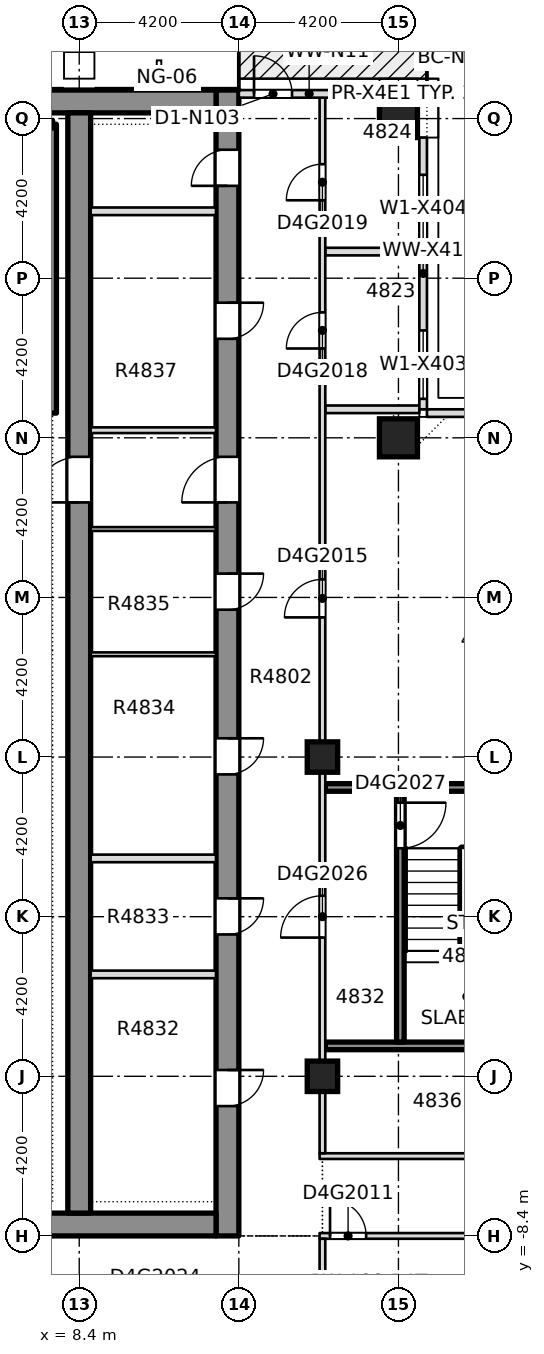
"""IFC4 building model, lengths in metres.
Left out: names, types, materials, properties, quantities, classifications, styles, units other than length and angle.
Written with IfcOpenShell. Run it as: python <this file> out.ifc"""

import sys

from ifc_helpers import new_model, si_unit, direction, frame, frame_2d, origin, origin_2d, place, context, subcontext, project, spatial, rectangle, extrude, element, fill, save


model = new_model("IFC4")
c1 = context("Model", 3, precision=1e-05, world=origin(), true_north=direction((0.0, 1.0)))
c2 = subcontext(c1, "Body", "Model", "MODEL_VIEW")
j1 = project(units=[si_unit("LENGTHUNIT", "METRE"), si_unit("PLANEANGLEUNIT", "RADIAN")], contexts=[c1])
p1 = place(None, origin())
s1 = spatial("IfcSite", under=j1, at=p1, CompositionType="ELEMENT")
p2 = place(p1, origin())
s2 = spatial("IfcBuilding", under=s1, at=p2, CompositionType="ELEMENT")
p3 = place(p2, frame((0.0, 0.0, 185.9)))
s3 = spatial("IfcBuildingStorey", under=s2, at=p3, CompositionType="ELEMENT", Elevation=185.9)
p4 = place(p3, frame((12.3, -8.4, -0.4), z_axis=(0.0, 0.0, 1.0), x_axis=(0.0, 1.0, 0.0)))
e1 = element("IfcWall", 1, at=p4, inside=s3, PredefinedType="SHEAR", context=c2, shape_type="SweptSolid", body=[
    extrude(rectangle(XDim=30.15, YDim=0.6, at=frame_2d((15.075, 0.0))), origin(), (0.0, 0.0, 1.0), 3.45),
])
p5 = place(p4, frame((3.416, 0.0, 0.4)))
e2 = element("IfcOpeningElement", 2, at=p5, cuts=e1, PredefinedType="OPENING", context=c2, shape_type="SweptSolid", body=[
    extrude(rectangle(XDim=0.95, YDim=2.1, at=frame_2d((0.475, 1.05))), frame((0.0, 0.31, 0.0), z_axis=(0.0, -1.0, 0.0), x_axis=(1.0, 0.0, 0.0)), (0.0, 0.0, 1.0), 0.62),
])
p6 = place(p4, frame((7.932, 0.0, 0.4)))
e3 = element("IfcOpeningElement", 3, at=p6, cuts=e1, PredefinedType="OPENING", context=c2, shape_type="SweptSolid", body=[
    extrude(rectangle(XDim=0.95, YDim=2.1, at=frame_2d((0.475, 1.05))), frame((0.0, 0.31, 0.0), z_axis=(0.0, -1.0, 0.0), x_axis=(1.0, 0.0, 0.0)), (0.0, 0.0, 1.0), 0.62),
])
p7 = place(p4, frame((12.144, 0.0, 0.4)))
e4 = element("IfcOpeningElement", 4, at=p7, cuts=e1, PredefinedType="OPENING", context=c2, shape_type="SweptSolid", body=[
    extrude(rectangle(XDim=0.95, YDim=2.1, at=frame_2d((0.475, 1.05))), frame((0.0, 0.31, 0.0), z_axis=(0.0, -1.0, 0.0), x_axis=(1.0, 0.0, 0.0)), (0.0, 0.0, 1.0), 0.62),
])
p8 = place(p4, frame((16.477, 0.0, 0.4)))
e5 = element("IfcOpeningElement", 5, at=p8, cuts=e1, PredefinedType="OPENING", context=c2, shape_type="SweptSolid", body=[
    extrude(rectangle(XDim=0.95, YDim=2.1, at=frame_2d((0.475, 1.05))), frame((0.0, 0.31, 0.0), z_axis=(0.0, -1.0, 0.0), x_axis=(1.0, 0.0, 0.0)), (0.0, 0.0, 1.0), 0.62),
])
p9 = place(p4, frame((23.605, 0.0, 0.4)))
e6 = element("IfcOpeningElement", 6, at=p9, cuts=e1, PredefinedType="OPENING", context=c2, shape_type="SweptSolid", body=[
    extrude(rectangle(XDim=0.95, YDim=2.1, at=frame_2d((0.475, 1.05))), frame((0.0, 0.31, 0.0), z_axis=(0.0, -1.0, 0.0), x_axis=(1.0, 0.0, 0.0)), (0.0, 0.0, 1.0), 0.62),
])
p10 = place(p4, frame((27.63, 0.0, 0.4)))
e7 = element("IfcOpeningElement", 7, at=p10, cuts=e1, PredefinedType="OPENING", context=c2, shape_type="SweptSolid", body=[
    extrude(rectangle(XDim=0.95, YDim=2.1, at=frame_2d((0.475, 1.05))), frame((0.0, 0.31, 0.0), z_axis=(0.0, -1.0, 0.0), x_axis=(1.0, 0.0, 0.0)), (0.0, 0.0, 1.0), 0.62),
])
p11 = place(p4, frame((19.3, 0.0, 0.4)))
e8 = element("IfcOpeningElement", 8, at=p11, cuts=e1, PredefinedType="OPENING", context=c2, shape_type="SweptSolid", body=[
    extrude(rectangle(XDim=1.2, YDim=2.1, at=frame_2d((0.6, 1.05))), frame((0.0, 0.31, 0.0), z_axis=(0.0, -1.0, 0.0), x_axis=(1.0, 0.0, 0.0)), (0.0, 0.0, 1.0), 0.62),
])
p12 = place(p3, frame((-12.0, -8.1, -0.4), z_axis=(0.0, 0.0, 1.0), x_axis=(1.0, 0.0, 0.0)))
e9 = element("IfcWall", 9, at=p12, inside=s3, PredefinedType="SHEAR", context=c2, shape_type="SweptSolid", body=[
    extrude(rectangle(XDim=24.0, YDim=0.6, at=frame_2d((12.0, 0.0))), origin(), (0.0, 0.0, 1.0), 3.45),
])
p13 = place(p12, frame((7.25, 0.0, 0.4)))
e10 = element("IfcOpeningElement", 10, at=p13, cuts=e9, PredefinedType="OPENING", context=c2, shape_type="SweptSolid", body=[
    extrude(rectangle(XDim=1.8, YDim=2.1, at=frame_2d((0.9, 1.05))), frame((0.0, 0.31, 0.0), z_axis=(0.0, -1.0, 0.0), x_axis=(1.0, 0.0, 0.0)), (0.0, 0.0, 1.0), 0.62),
])
p14 = place(p12, frame((14.95, 0.0, 0.4)))
e11 = element("IfcOpeningElement", 11, at=p14, cuts=e9, PredefinedType="OPENING", context=c2, shape_type="SweptSolid", body=[
    extrude(rectangle(XDim=1.8, YDim=2.1, at=frame_2d((0.9, 1.05))), frame((0.0, 0.31, 0.0), z_axis=(0.0, -1.0, 0.0), x_axis=(1.0, 0.0, 0.0)), (0.0, 0.0, 1.0), 0.62),
])
p15 = place(p3, frame((-12.0, 21.45, -0.4), z_axis=(0.0, 0.0, 1.0), x_axis=(1.0, 0.0, 0.0)))
e12 = element("IfcWall", 12, at=p15, inside=s3, PredefinedType="SHEAR", context=c2, shape_type="SweptSolid", body=[
    extrude(rectangle(XDim=24.0, YDim=0.6, at=frame_2d((12.0, 0.0))), origin(), (0.0, 0.0, 1.0), 3.45),
])
p16 = place(p3, frame((8.4, -7.8, -0.4), z_axis=(0.0, 0.0, 1.0), x_axis=(0.0, 1.0, 0.0)))
e13 = element("IfcWall", 13, at=p16, inside=s3, PredefinedType="SHEAR", context=c2, shape_type="SweptSolid", body=[
    extrude(rectangle(XDim=28.95, YDim=0.6, at=frame_2d((14.475, 0.0))), origin(), (0.0, 0.0, 1.0), 3.45),
])
p17 = place(p16, frame((18.7, 0.0, 0.4)))
e14 = element("IfcOpeningElement", 14, at=p17, cuts=e13, PredefinedType="OPENING", context=c2, shape_type="SweptSolid", body=[
    extrude(rectangle(XDim=1.2, YDim=2.1, at=frame_2d((0.6, 1.05))), frame((0.0, 0.31, 0.0), z_axis=(0.0, -1.0, 0.0), x_axis=(1.0, 0.0, 0.0)), (0.0, 0.0, 1.0), 0.62),
])
for number, where, z_axis, x_axis in (
    (15, (16.8, 12.6, -0.4), (0.0, 0.0, 1.0), (1.0, 0.0, 0.0)),
    (16, (16.8, 21.0, -0.4), (0.0, 0.0, 1.0), (1.0, 0.0, 0.0)),
):
    element("IfcColumn", number, at=place(p3, frame(where, z_axis=z_axis, x_axis=x_axis)), inside=s3, PredefinedType="COLUMN", context=c2, shape_type="SweptSolid", body=[
        extrude(rectangle(XDim=1.0, YDim=1.0, at=origin_2d()), origin(), (0.0, 0.0, 1.0), 3.45),
    ])
for number, where, z_axis, x_axis in (
    (17, (14.8, -4.2, -0.4), (0.0, 0.0, 1.0), (1.0, 0.0, 0.0)),
    (18, (14.8, 4.2, -0.4), (0.0, 0.0, 1.0), (1.0, 0.0, 0.0)),
):
    element("IfcColumn", number, at=place(p3, frame(where, z_axis=z_axis, x_axis=x_axis)), inside=s3, PredefinedType="COLUMN", context=c2, shape_type="SweptSolid", body=[
        extrude(rectangle(XDim=0.8, YDim=0.8, at=origin_2d()), origin(), (0.0, 0.0, 1.0), 3.45),
    ])
p18 = place(p3, frame((14.725, -8.4, 0.0), z_axis=(0.0, 0.0, 1.0), x_axis=(1.0, 0.0, 0.0)))
e19 = element("IfcWall", 19, at=p18, inside=s3, PredefinedType="PARTITIONING", context=c2, shape_type="SweptSolid", body=[
    extrude(rectangle(XDim=11.025, YDim=0.15, at=frame_2d((5.512, 0.0))), origin(), (0.0, 0.0, 1.0), 3.05),
])
p19 = place(p18, frame((0.275, 0.0, 0.0)))
e20 = element("IfcOpeningElement", 20, at=p19, cuts=e19, PredefinedType="OPENING", context=c2, shape_type="SweptSolid", body=[
    extrude(rectangle(XDim=0.95, YDim=2.1, at=frame_2d((0.475, 1.05))), frame((0.0, 0.085, 0.0), z_axis=(0.0, -1.0, 0.0), x_axis=(1.0, 0.0, 0.0)), (0.0, 0.0, 1.0), 0.17),
])
p20 = place(p3, frame((14.725, -6.3, 0.0), z_axis=(0.0, 0.0, 1.0), x_axis=(1.0, 0.0, 0.0)))
e21 = element("IfcWall", 21, at=p20, inside=s3, PredefinedType="PARTITIONING", context=c2, shape_type="SweptSolid", body=[
    extrude(rectangle(XDim=11.025, YDim=0.15, at=frame_2d((5.512, 0.0))), origin(), (0.0, 0.0, 1.0), 3.05),
])
p21 = place(p20, frame((5.15, 0.0, 0.0)))
e22 = element("IfcOpeningElement", 22, at=p21, cuts=e21, PredefinedType="OPENING", context=c2, shape_type="SweptSolid", body=[
    extrude(rectangle(XDim=1.0, YDim=2.1, at=frame_2d((0.5, 1.05))), frame((0.0, 0.085, 0.0), z_axis=(0.0, -1.0, 0.0), x_axis=(1.0, 0.0, 0.0)), (0.0, 0.0, 1.0), 0.17),
])
p22 = place(p3, frame((14.875, -3.4, 0.0), z_axis=(0.0, 0.0, 1.0), x_axis=(1.0, 0.0, 0.0)))
e23 = element("IfcWall", 23, at=p22, inside=s3, PredefinedType="SOLIDWALL", context=c2, shape_type="SweptSolid", body=[
    extrude(rectangle(XDim=8.125, YDim=0.2, at=frame_2d((4.062, 0.0))), origin(), (0.0, 0.0, 1.0), 3.05),
])
p23 = place(p3, frame((14.875, 3.4, 0.0), z_axis=(0.0, 0.0, 1.0), x_axis=(1.0, 0.0, 0.0)))
e24 = element("IfcWall", 24, at=p23, inside=s3, PredefinedType="SOLIDWALL", context=c2, shape_type="SweptSolid", body=[
    extrude(rectangle(XDim=5.575, YDim=0.2, at=frame_2d((2.788, 0.0))), origin(), (0.0, 0.0, 1.0), 3.05),
])
for number, where, z_axis, x_axis in (
    (25, (14.875, 13.35, 0.0), (0.0, 0.0, 1.0), (1.0, 0.0, 0.0)),
    (26, (14.875, 17.5, 0.0), (0.0, 0.0, 1.0), (1.0, 0.0, 0.0)),
):
    element("IfcWall", number, at=place(p3, frame(where, z_axis=z_axis, x_axis=x_axis)), inside=s3, PredefinedType="PARTITIONING", context=c2, shape_type="SweptSolid", body=[
        extrude(rectangle(XDim=2.475, YDim=0.2, at=frame_2d((1.238, 0.0))), origin(), (0.0, 0.0, 1.0), 3.05),
    ])
p24 = place(p3, frame((14.8, -10.6, 0.0), z_axis=(0.0, 0.0, 1.0), x_axis=(0.0, 1.0, 0.0)))
e27 = element("IfcWall", 27, at=p24, inside=s3, PredefinedType="PARTITIONING", context=c2, shape_type="SweptSolid", body=[
    extrude(rectangle(XDim=2.125, YDim=0.15, at=frame_2d((1.062, 0.0))), origin(), (0.0, 0.0, 1.0), 3.05),
])
p25 = place(p3, frame((14.8, -6.225, 0.0), z_axis=(0.0, 0.0, 1.0), x_axis=(0.0, 1.0, 0.0)))
e28 = element("IfcWall", 28, at=p25, inside=s3, PredefinedType="PARTITIONING", context=c2, shape_type="SweptSolid", body=[
    extrude(rectangle(XDim=27.775, YDim=0.15, at=frame_2d((13.888, 0.0))), origin(), (0.0, 0.0, 1.0), 3.05),
])
p26 = place(p25, frame((14.1, 0.0, 0.0)))
e29 = element("IfcOpeningElement", 29, at=p26, cuts=e28, PredefinedType="OPENING", context=c2, shape_type="SweptSolid", body=[
    extrude(rectangle(XDim=1.0, YDim=2.1, at=frame_2d((0.5, 1.05))), frame((0.0, 0.085, 0.0), z_axis=(0.0, -1.0, 0.0), x_axis=(1.0, 0.0, 0.0)), (0.0, 0.0, 1.0), 0.17),
])
p27 = place(p25, frame((21.175, 0.0, 0.0)))
e30 = element("IfcOpeningElement", 30, at=p27, cuts=e28, PredefinedType="OPENING", context=c2, shape_type="SweptSolid", body=[
    extrude(rectangle(XDim=0.95, YDim=2.1, at=frame_2d((0.475, 1.05))), frame((0.0, 0.085, 0.0), z_axis=(0.0, -1.0, 0.0), x_axis=(1.0, 0.0, 0.0)), (0.0, 0.0, 1.0), 0.17),
])
p28 = place(p25, frame((25.075, 0.0, 0.0)))
e31 = element("IfcOpeningElement", 31, at=p28, cuts=e28, PredefinedType="OPENING", context=c2, shape_type="SweptSolid", body=[
    extrude(rectangle(XDim=0.95, YDim=2.1, at=frame_2d((0.475, 1.05))), frame((0.0, 0.085, 0.0), z_axis=(0.0, -1.0, 0.0), x_axis=(1.0, 0.0, 0.0)), (0.0, 0.0, 1.0), 0.17),
])
p29 = place(p25, frame((5.675, 0.0, 0.0)))
e32 = element("IfcOpeningElement", 32, at=p29, cuts=e28, PredefinedType="OPENING", context=c2, shape_type="SweptSolid", body=[
    extrude(rectangle(XDim=1.1, YDim=2.1, at=frame_2d((0.55, 1.05))), frame((0.0, 0.085, 0.0), z_axis=(0.0, -1.0, 0.0), x_axis=(1.0, 0.0, 0.0)), (0.0, 0.0, 1.0), 0.17),
])
p30 = place(p3, frame((16.85, -3.3, 0.0), z_axis=(0.0, 0.0, 1.0), x_axis=(0.0, 1.0, 0.0)))
e33 = element("IfcWall", 33, at=p30, inside=s3, PredefinedType="SOLIDWALL", context=c2, shape_type="SweptSolid", body=[
    extrude(rectangle(XDim=6.6, YDim=0.2, at=frame_2d((3.3, 0.0))), origin(), (0.0, 0.0, 1.0), 3.05),
])
p31 = place(p30, frame((5.1, 0.0, 0.0)))
e34 = element("IfcOpeningElement", 34, at=p31, cuts=e33, PredefinedType="OPENING", context=c2, shape_type="SweptSolid", body=[
    extrude(rectangle(XDim=1.2, YDim=2.1, at=frame_2d((0.6, 1.05))), frame((0.0, 0.11, 0.0), z_axis=(0.0, -1.0, 0.0), x_axis=(1.0, 0.0, 0.0)), (0.0, 0.0, 1.0), 0.22),
])
p32 = place(p3, frame((24.7, 13.25, 0.0), z_axis=(0.0, 0.0, 1.0), x_axis=(-1.0, 0.0, 0.0)))
e35 = element("IfcWall", 35, at=p32, inside=s3, PredefinedType="STANDARD", context=c2, shape_type="SweptSolid", body=[
    extrude(rectangle(XDim=7.15, YDim=0.2, at=frame_2d((3.575, 0.0))), origin(), (0.0, 0.0, 1.0), 3.05),
])
p33 = place(p3, frame((17.45, 13.35, 0.0), z_axis=(0.0, 0.0, 1.0), x_axis=(0.0, 1.0, 0.0)))
e36 = element("IfcWall", 36, at=p33, inside=s3, PredefinedType="STANDARD", context=c2, shape_type="SweptSolid", body=[
    extrude(rectangle(XDim=7.15, YDim=0.2, at=frame_2d((3.575, 0.0))), origin(), (0.0, 0.0, 1.0), 3.05),
])
p34 = place(p33, frame((0.275, 0.0, 0.2)))
e37 = element("IfcOpeningElement", 37, at=p34, cuts=e36, PredefinedType="OPENING", context=c2, shape_type="SweptSolid", body=[
    extrude(rectangle(XDim=1.8, YDim=2.65, at=frame_2d((0.9, 1.325))), frame((0.0, 0.11, 0.0), z_axis=(0.0, -1.0, 0.0), x_axis=(1.0, 0.0, 0.0)), (0.0, 0.0, 1.0), 0.22),
])
p35 = place(p33, frame((4.37, 0.0, 0.2)))
e38 = element("IfcOpeningElement", 38, at=p35, cuts=e36, PredefinedType="OPENING", context=c2, shape_type="SweptSolid", body=[
    extrude(rectangle(XDim=1.8, YDim=2.65, at=frame_2d((0.9, 1.325))), frame((0.0, 0.11, 0.0), z_axis=(0.0, -1.0, 0.0), x_axis=(1.0, 0.0, 0.0)), (0.0, 0.0, 1.0), 0.22),
])
p36 = place(p3, frame((16.3, 21.65, 0.0), z_axis=(0.0, 0.0, 1.0), x_axis=(-1.0, 0.0, 0.0)))
e39 = element("IfcWall", 39, at=p36, inside=s3, PredefinedType="STANDARD", context=c2, shape_type="SweptSolid", body=[
    extrude(rectangle(XDim=3.7, YDim=0.2, at=frame_2d((1.85, 0.0))), origin(), (0.0, 0.0, 1.0), 3.05),
])
p37 = place(p36, frame((2.3, 0.0, 0.0)))
e40 = element("IfcOpeningElement", 40, at=p37, cuts=e39, PredefinedType="OPENING", context=c2, shape_type="SweptSolid", body=[
    extrude(rectangle(XDim=1.0, YDim=2.4, at=frame_2d((0.5, 1.2))), frame((0.0, 0.11, 0.0), z_axis=(0.0, -1.0, 0.0), x_axis=(1.0, 0.0, 0.0)), (0.0, 0.0, 1.0), 0.22),
])
for number, where, z_axis, x_axis in (
    (41, (8.701, -1.519, 0.0), (0.0, 0.0, 1.0), (1.0, 0.0, 0.0)),
    (42, (8.701, 1.533, 0.0), (0.0, 0.0, 1.0), (1.0, 0.0, 0.0)),
):
    element("IfcWall", number, at=place(p3, frame(where, z_axis=z_axis, x_axis=x_axis)), inside=s3, PredefinedType="PARTITIONING", context=c2, shape_type="SweptSolid", body=[
        extrude(rectangle(XDim=3.298, YDim=0.2, at=frame_2d((1.649, 0.0))), origin(), (0.0, 0.0, 1.0), 3.05),
    ])
for number, where, z_axis, x_axis in (
    (43, (8.701, 6.904, 0.0), (0.0, 0.0, 1.0), (1.0, 0.0, 0.0)),
    (44, (8.701, 10.2, 0.0), (0.0, 0.0, 1.0), (1.0, 0.0, 0.0)),
):
    element("IfcWall", number, at=place(p3, frame(where, z_axis=z_axis, x_axis=x_axis)), inside=s3, PredefinedType="PARTITIONING", context=c2, shape_type="SweptSolid", body=[
        extrude(rectangle(XDim=3.298, YDim=0.1, at=frame_2d((1.649, 0.0))), origin(), (0.0, 0.0, 1.0), 3.05),
    ])
p38 = place(p3, frame((8.701, 12.8, 0.0), z_axis=(0.0, 0.0, 1.0), x_axis=(1.0, 0.0, 0.0)))
e45 = element("IfcWall", 45, at=p38, inside=s3, PredefinedType="PARTITIONING", context=c2, shape_type="SweptSolid", body=[
    extrude(rectangle(XDim=3.298, YDim=0.15, at=frame_2d((1.649, 0.0))), origin(), (0.0, 0.0, 1.0), 3.05),
])
p39 = place(p3, frame((8.701, 18.56, 0.0), z_axis=(0.0, 0.0, 1.0), x_axis=(1.0, 0.0, 0.0)))
e46 = element("IfcWall", 46, at=p39, inside=s3, PredefinedType="PARTITIONING", context=c2, shape_type="SweptSolid", body=[
    extrude(rectangle(XDim=3.298, YDim=0.2, at=frame_2d((1.649, 0.0))), origin(), (0.0, 0.0, 1.0), 3.05),
])
p40 = place(p3, frame((7.7, 13.25, 0.0), z_axis=(0.0, 0.0, 1.0), x_axis=(0.0, 1.0, 0.0)))
e47 = element("IfcWall", 47, at=p40, inside=s3, PredefinedType="SOLIDWALL", context=c2, shape_type="SweptSolid", body=[
    extrude(rectangle(XDim=7.6, YDim=0.2, at=frame_2d((3.8, 0.0))), origin(), (0.0, 0.0, 1.0), 3.05),
])
p41 = place(p19, origin())
e48 = element("IfcDoor", 48, at=p41, inside=s3, OperationType="SINGLE_SWING_RIGHT", PredefinedType="DOOR", context=c2, shape_type="SweptSolid", body=[
    extrude(rectangle(XDim=0.95, YDim=2.1, at=frame_2d((0.475, 1.05))), frame((0.0, 0.025, 0.0), z_axis=(0.0, -1.0, 0.0), x_axis=(1.0, 0.0, 0.0)), (0.0, 0.0, 1.0), 0.05),
])
fill(e20, e48)
p42 = place(p26, origin())
e49 = element("IfcDoor", 49, at=p42, inside=s3, OperationType="SINGLE_SWING_RIGHT", PredefinedType="DOOR", context=c2, shape_type="SweptSolid", body=[
    extrude(rectangle(XDim=1.0, YDim=2.1, at=frame_2d((0.5, 1.05))), frame((0.0, 0.025, 0.0), z_axis=(0.0, -1.0, 0.0), x_axis=(1.0, 0.0, 0.0)), (0.0, 0.0, 1.0), 0.05),
])
fill(e29, e49)
p43 = place(p27, origin())
e50 = element("IfcDoor", 50, at=p43, inside=s3, OperationType="SINGLE_SWING_LEFT", PredefinedType="DOOR", context=c2, shape_type="SweptSolid", body=[
    extrude(rectangle(XDim=0.95, YDim=2.1, at=frame_2d((0.475, 1.05))), frame((0.0, 0.025, 0.0), z_axis=(0.0, -1.0, 0.0), x_axis=(1.0, 0.0, 0.0)), (0.0, 0.0, 1.0), 0.05),
])
fill(e30, e50)
p44 = place(p28, origin())
e51 = element("IfcDoor", 51, at=p44, inside=s3, OperationType="SINGLE_SWING_RIGHT", PredefinedType="DOOR", context=c2, shape_type="SweptSolid", body=[
    extrude(rectangle(XDim=0.95, YDim=2.1, at=frame_2d((0.475, 1.05))), frame((0.0, 0.025, 0.0), z_axis=(0.0, -1.0, 0.0), x_axis=(1.0, 0.0, 0.0)), (0.0, 0.0, 1.0), 0.05),
])
fill(e31, e51)
p45 = place(p29, origin())
e52 = element("IfcDoor", 52, at=p45, inside=s3, OperationType="SINGLE_SWING_LEFT", PredefinedType="DOOR", context=c2, shape_type="SweptSolid", body=[
    extrude(rectangle(XDim=1.1, YDim=2.1, at=frame_2d((0.55, 1.05))), frame((0.0, 0.025, 0.0), z_axis=(0.0, -1.0, 0.0), x_axis=(1.0, 0.0, 0.0)), (0.0, 0.0, 1.0), 0.05),
])
fill(e32, e52)
p46 = place(p31, origin())
e53 = element("IfcDoor", 53, at=p46, inside=s3, OperationType="SINGLE_SWING_LEFT", PredefinedType="DOOR", context=c2, shape_type="SweptSolid", body=[
    extrude(rectangle(XDim=1.2, YDim=2.1, at=frame_2d((0.6, 1.05))), frame((0.0, 0.025, 0.0), z_axis=(0.0, -1.0, 0.0), x_axis=(1.0, 0.0, 0.0)), (0.0, 0.0, 1.0), 0.05),
])
fill(e34, e53)
p47 = place(p34, origin())
e54 = element("IfcWindow", 54, at=p47, inside=s3, PartitioningType="SINGLE_PANEL", PredefinedType="WINDOW", context=c2, shape_type="SweptSolid", body=[
    extrude(rectangle(XDim=1.8, YDim=2.65, at=frame_2d((0.9, 1.325))), frame((0.0, 0.03, 0.0), z_axis=(0.0, -1.0, 0.0), x_axis=(1.0, 0.0, 0.0)), (0.0, 0.0, 1.0), 0.06),
])
fill(e37, e54)
p48 = place(p35, origin())
e55 = element("IfcWindow", 55, at=p48, inside=s3, PartitioningType="SINGLE_PANEL", PredefinedType="WINDOW", context=c2, shape_type="SweptSolid", body=[
    extrude(rectangle(XDim=1.8, YDim=2.65, at=frame_2d((0.9, 1.325))), frame((0.0, 0.03, 0.0), z_axis=(0.0, -1.0, 0.0), x_axis=(1.0, 0.0, 0.0)), (0.0, 0.0, 1.0), 0.06),
])
fill(e38, e55)
p49 = place(p37, origin())
e56 = element("IfcDoor", 56, at=p49, inside=s3, OperationType="SINGLE_SWING_LEFT", PredefinedType="DOOR", context=c2, shape_type="SweptSolid", body=[
    extrude(rectangle(XDim=1.0, YDim=2.4, at=frame_2d((0.5, 1.2))), frame((0.0, 0.025, 0.0), z_axis=(0.0, -1.0, 0.0), x_axis=(1.0, 0.0, 0.0)), (0.0, 0.0, 1.0), 0.05),
])
fill(e40, e56)
p50 = place(p5, origin())
e57 = element("IfcDoor", 57, at=p50, inside=s3, OperationType="SINGLE_SWING_LEFT", PredefinedType="DOOR", context=c2, shape_type="SweptSolid", body=[
    extrude(rectangle(XDim=0.95, YDim=2.1, at=frame_2d((0.475, 1.05))), frame((0.0, 0.025, 0.0), z_axis=(0.0, -1.0, 0.0), x_axis=(1.0, 0.0, 0.0)), (0.0, 0.0, 1.0), 0.05),
])
fill(e2, e57)
p51 = place(p6, origin())
e58 = element("IfcDoor", 58, at=p51, inside=s3, OperationType="SINGLE_SWING_LEFT", PredefinedType="DOOR", context=c2, shape_type="SweptSolid", body=[
    extrude(rectangle(XDim=0.95, YDim=2.1, at=frame_2d((0.475, 1.05))), frame((0.0, 0.025, 0.0), z_axis=(0.0, -1.0, 0.0), x_axis=(1.0, 0.0, 0.0)), (0.0, 0.0, 1.0), 0.05),
])
fill(e3, e58)
p52 = place(p7, origin())
e59 = element("IfcDoor", 59, at=p52, inside=s3, OperationType="SINGLE_SWING_LEFT", PredefinedType="DOOR", context=c2, shape_type="SweptSolid", body=[
    extrude(rectangle(XDim=0.95, YDim=2.1, at=frame_2d((0.475, 1.05))), frame((0.0, 0.025, 0.0), z_axis=(0.0, -1.0, 0.0), x_axis=(1.0, 0.0, 0.0)), (0.0, 0.0, 1.0), 0.05),
])
fill(e4, e59)
p53 = place(p8, origin())
e60 = element("IfcDoor", 60, at=p53, inside=s3, OperationType="SINGLE_SWING_LEFT", PredefinedType="DOOR", context=c2, shape_type="SweptSolid", body=[
    extrude(rectangle(XDim=0.95, YDim=2.1, at=frame_2d((0.475, 1.05))), frame((0.0, 0.025, 0.0), z_axis=(0.0, -1.0, 0.0), x_axis=(1.0, 0.0, 0.0)), (0.0, 0.0, 1.0), 0.05),
])
fill(e5, e60)
p54 = place(p9, origin())
e61 = element("IfcDoor", 61, at=p54, inside=s3, OperationType="SINGLE_SWING_LEFT", PredefinedType="DOOR", context=c2, shape_type="SweptSolid", body=[
    extrude(rectangle(XDim=0.95, YDim=2.1, at=frame_2d((0.475, 1.05))), frame((0.0, 0.025, 0.0), z_axis=(0.0, -1.0, 0.0), x_axis=(1.0, 0.0, 0.0)), (0.0, 0.0, 1.0), 0.05),
])
fill(e6, e61)
p55 = place(p10, origin())
e62 = element("IfcDoor", 62, at=p55, inside=s3, OperationType="SINGLE_SWING_LEFT", PredefinedType="DOOR", context=c2, shape_type="SweptSolid", body=[
    extrude(rectangle(XDim=0.95, YDim=2.1, at=frame_2d((0.475, 1.05))), frame((0.0, 0.025, 0.0), z_axis=(0.0, -1.0, 0.0), x_axis=(1.0, 0.0, 0.0)), (0.0, 0.0, 1.0), 0.05),
])
fill(e7, e62)
p56 = place(p11, origin())
e63 = element("IfcDoor", 63, at=p56, inside=s3, OperationType="SINGLE_SWING_LEFT", PredefinedType="DOOR", context=c2, shape_type="SweptSolid", body=[
    extrude(rectangle(XDim=1.2, YDim=2.1, at=frame_2d((0.6, 1.05))), frame((0.0, 0.025, 0.0), z_axis=(0.0, -1.0, 0.0), x_axis=(1.0, 0.0, 0.0)), (0.0, 0.0, 1.0), 0.05),
])
fill(e8, e63)
p57 = place(p17, origin())
e64 = element("IfcDoor", 64, at=p57, inside=s3, OperationType="SINGLE_SWING_LEFT", PredefinedType="DOOR", context=c2, shape_type="SweptSolid", body=[
    extrude(rectangle(XDim=1.2, YDim=2.1, at=frame_2d((0.6, 1.05))), frame((0.0, 0.025, 0.0), z_axis=(0.0, -1.0, 0.0), x_axis=(1.0, 0.0, 0.0)), (0.0, 0.0, 1.0), 0.05),
])
fill(e14, e64)
save(model, sys.argv[1])
